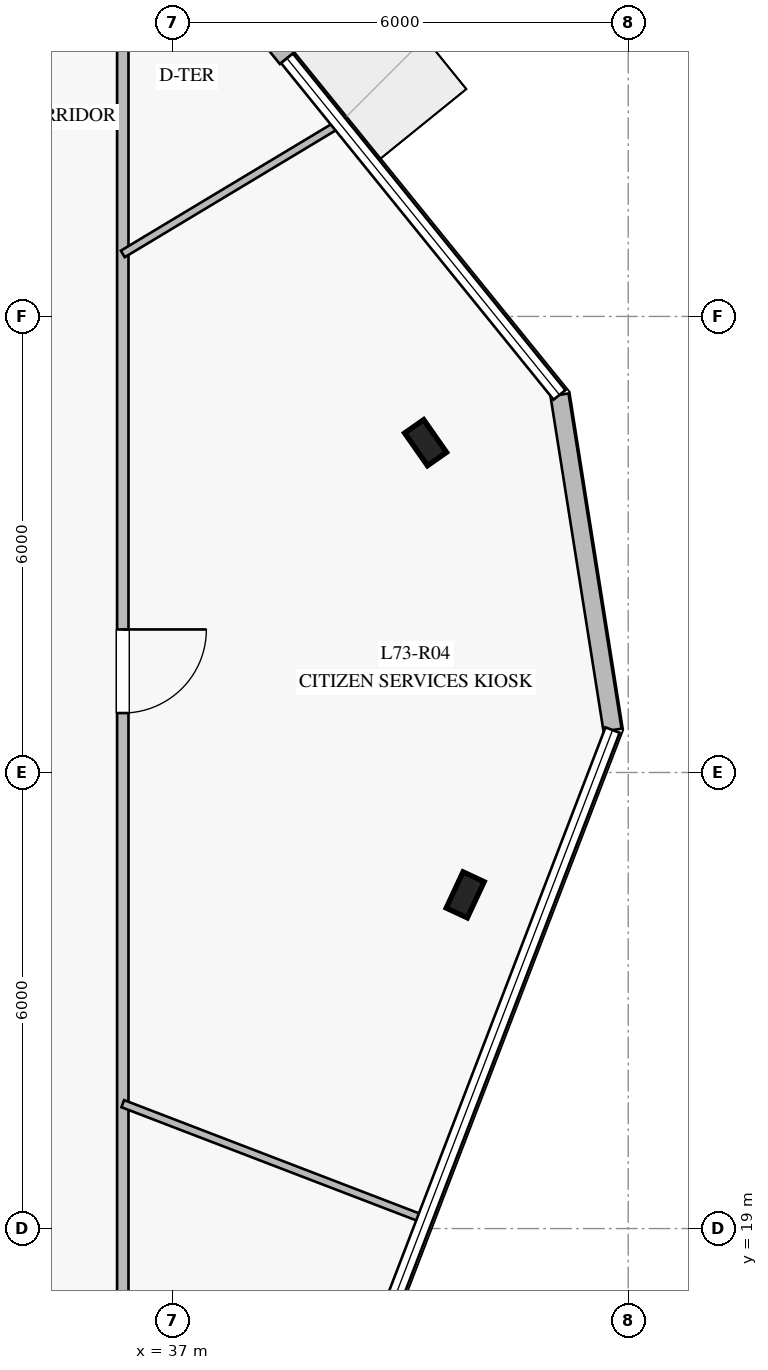
"""IFC4 building model, lengths in metres.
Left out: names, types, materials, properties, quantities, classifications, styles, units other than length and angle.
Written with IfcOpenShell. Run it as: python <this file> out.ifc"""

import sys

from ifc_helpers import new_model, si_unit, direction, frame, frame_2d, origin, origin_2d, place, context, subcontext, project, spatial, rectangle, i_section, extrude, element, fill, save


model = new_model("IFC4")
c1 = context("Model", 3, precision=1e-05, world=origin(), true_north=direction((0.0, 1.0)))
c2 = subcontext(c1, "Body", "Model", "MODEL_VIEW")
j1 = project(units=[si_unit("LENGTHUNIT", "METRE"), si_unit("PLANEANGLEUNIT", "RADIAN")], contexts=[c1])
p1 = place(None, origin())
s1 = spatial("IfcSite", under=j1, at=p1, CompositionType="ELEMENT")
p2 = place(p1, origin())
s2 = spatial("IfcBuilding", under=s1, at=p2, CompositionType="ELEMENT")
p3 = place(p2, frame((0.0, 0.0, 302.2)))
s3 = spatial("IfcBuildingStorey", under=s2, at=p3, CompositionType="ELEMENT", Elevation=302.2)
for number, where, z_axis, x_axis in (
    (1, (40.855, 23.39, 0.0), (0.0, 0.0, 1.0), (0.423, 0.906, 0.0)),
    (2, (40.334, 29.339, 0.0), (0.0, 0.0, 1.0), (-0.574, 0.819, 0.0)),
):
    element("IfcColumn", number, at=place(p3, frame(where, z_axis=z_axis, x_axis=x_axis)), inside=s3, PredefinedType="COLUMN", context=c2, shape_type="SweptSolid", body=[
        extrude(i_section(OverallWidth=0.306, OverallDepth=0.524, WebThickness=0.021, FlangeThickness=0.04, at=origin_2d()), origin(), (0.0, 0.0, 1.0), 4.0),
    ])
p4 = place(p3, frame((42.794, 25.558, 0.0), z_axis=(0.0, 0.0, 1.0), x_axis=(-0.156333211552, 0.987704372252, 0.0)))
e3 = element("IfcWall", 3, at=p4, inside=s3, PredefinedType="STANDARD", context=c2, shape_type="SweptSolid", body=[
    extrude(rectangle(XDim=4.465, YDim=0.24, at=frame_2d((2.232, 0.0))), origin(), (0.0, 0.0, 1.0), 3.78),
])
p5 = place(p3, frame((38.51, 34.396, 0.0), z_axis=(0.0, 0.0, 1.0), x_axis=(-0.629063630367, 0.777353811948, 0.0)))
e4 = element("IfcWall", 4, at=p5, inside=s3, PredefinedType="STANDARD", context=c2, shape_type="SweptSolid", body=[
    extrude(rectangle(XDim=2.4, YDim=0.24, at=frame_2d((1.2, 0.0))), origin(), (0.0, 0.0, 1.0), 3.78),
])
p6 = place(p5, frame((0.4, 0.0, 0.0)))
e5 = element("IfcOpeningElement", 5, at=p6, cuts=e4, PredefinedType="OPENING", context=c2, shape_type="SweptSolid", body=[
    extrude(rectangle(XDim=1.6, YDim=2.25, at=frame_2d((0.8, 1.125))), frame((0.0, 0.13, 0.0), z_axis=(0.0, -1.0, 0.0), x_axis=(1.0, 0.0, 0.0)), (0.0, 0.0, 1.0), 0.26),
])
p7 = place(p3, frame((36.35, 35.75, 0.0), z_axis=(0.0, 0.0, 1.0), x_axis=(0.0, -1.0, 0.0)))
e6 = element("IfcWall", 6, at=p7, inside=s3, PredefinedType="PARTITIONING", context=c2, shape_type="SweptSolid", body=[
    extrude(rectangle(XDim=21.5, YDim=0.15, at=frame_2d((10.75, 0.0))), origin(), (0.0, 0.0, 1.0), 3.05),
])
p8 = place(p7, frame((17.585, 0.0, 0.0)))
e7 = element("IfcOpeningElement", 7, at=p8, cuts=e6, PredefinedType="OPENING", context=c2, shape_type="SweptSolid", body=[
    extrude(rectangle(XDim=1.1, YDim=2.2, at=frame_2d((0.55, 1.1))), frame((0.0, 0.085, 0.0), z_axis=(0.0, -1.0, 0.0), x_axis=(1.0, 0.0, 0.0)), (0.0, 0.0, 1.0), 0.17),
])
p9 = place(p7, frame((8.868, 0.0, 0.0)))
e8 = element("IfcOpeningElement", 8, at=p9, cuts=e6, PredefinedType="OPENING", context=c2, shape_type="SweptSolid", body=[
    extrude(rectangle(XDim=1.1, YDim=2.2, at=frame_2d((0.55, 1.1))), frame((0.0, 0.085, 0.0), z_axis=(0.0, -1.0, 0.0), x_axis=(1.0, 0.0, 0.0)), (0.0, 0.0, 1.0), 0.17),
])
p10 = place(p3, frame((36.35, 20.643, 0.0), z_axis=(0.0, 0.0, 1.0), x_axis=(0.933566635169, -0.358403875117, 0.0)))
e9 = element("IfcWall", 9, at=p10, inside=s3, PredefinedType="MOVABLE", context=c2, shape_type="SweptSolid", body=[
    extrude(rectangle(XDim=4.238, YDim=0.1, at=frame_2d((2.119, 0.0))), origin(), (0.0, 0.0, 1.0), 3.05),
])
p11 = place(p3, frame((36.35, 31.822, 0.0), z_axis=(0.0, 0.0, 1.0), x_axis=(0.857024658814, 0.515275396448, 0.0)))
e10 = element("IfcWall", 10, at=p11, inside=s3, PredefinedType="MOVABLE", context=c2, shape_type="SweptSolid", body=[
    extrude(rectangle(XDim=3.315, YDim=0.1, at=frame_2d((1.657, 0.0))), origin(), (0.0, 0.0, 1.0), 3.28),
])
p12 = place(p9, origin())
e11 = element("IfcDoor", 11, at=p12, inside=s3, OperationType="SINGLE_SWING_LEFT", PredefinedType="DOOR", context=c2, shape_type="SweptSolid", body=[
    extrude(rectangle(XDim=1.1, YDim=2.2, at=frame_2d((0.55, 1.1))), frame((0.0, 0.025, 0.0), z_axis=(0.0, -1.0, 0.0), x_axis=(1.0, 0.0, 0.0)), (0.0, 0.0, 1.0), 0.05),
])
fill(e8, e11)
save(model, sys.argv[1])
